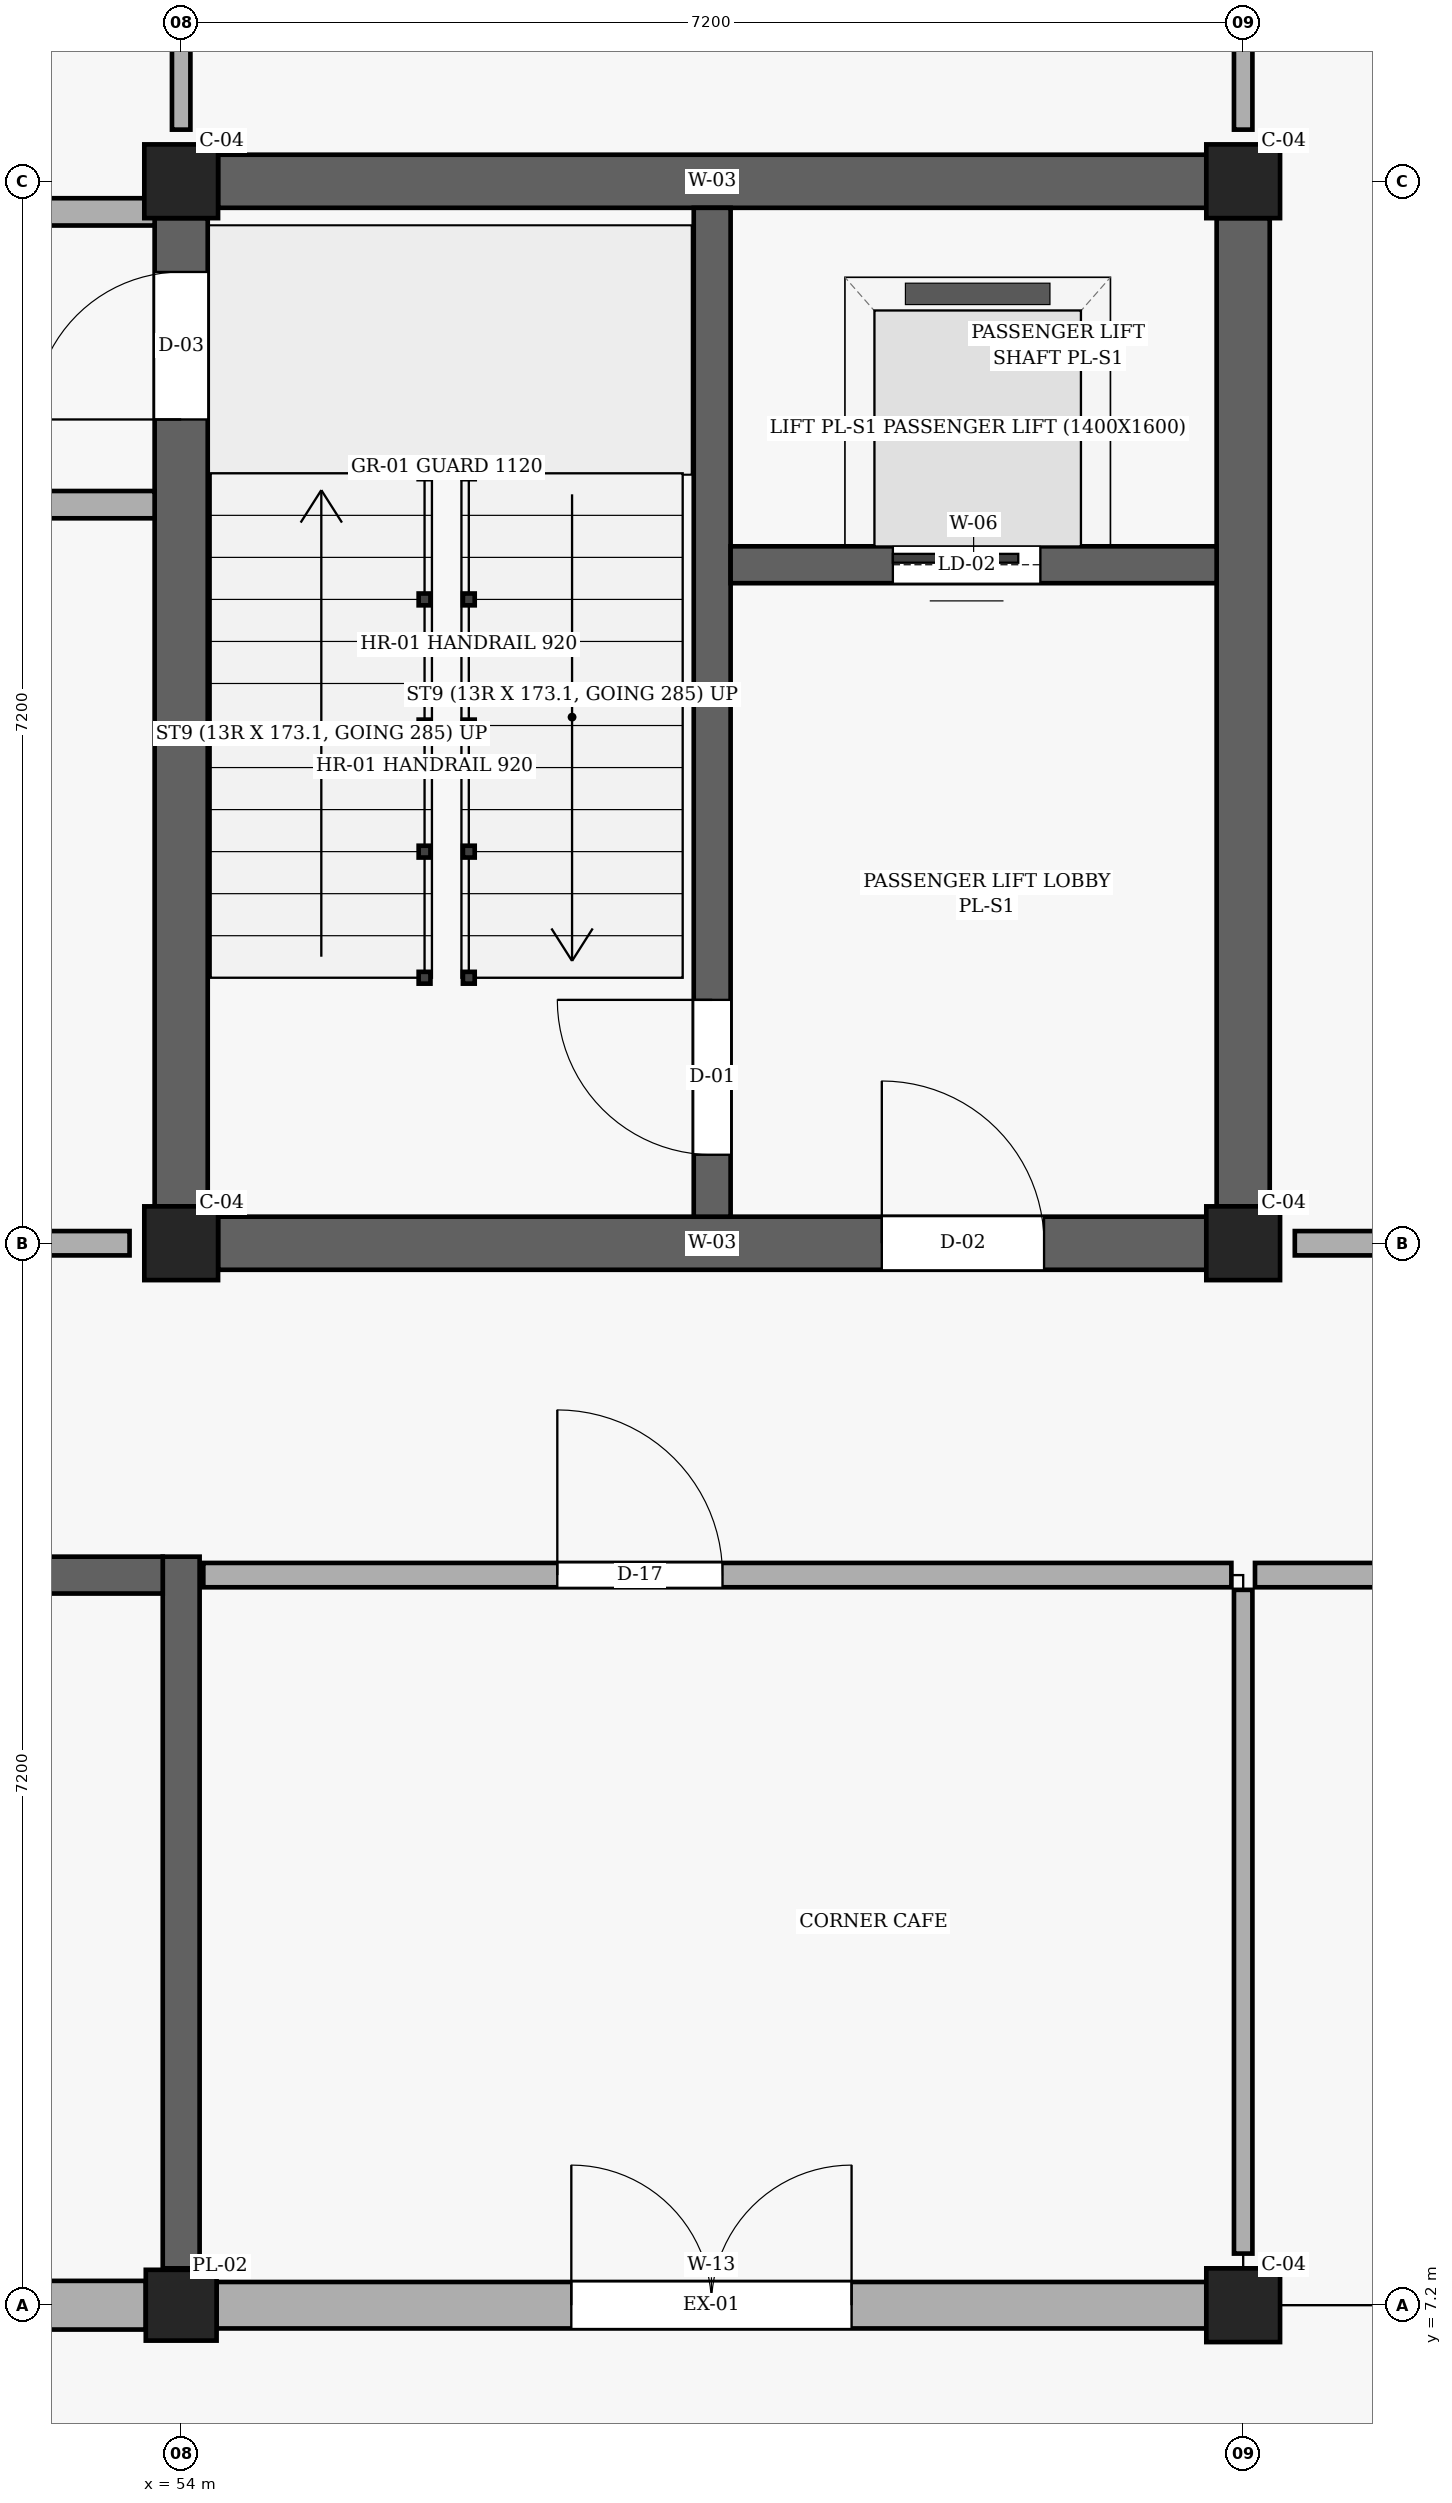
"""IFC4 building model, lengths in metres.
Left out: names, types, materials, properties, quantities, classifications, styles, units other than length and angle.
Written with IfcOpenShell. Run it as: python <this file> out.ifc"""

import sys

from ifc_helpers import new_model, si_unit, direction, frame, frame_2d, origin, origin_2d, place, context, subcontext, project, spatial, rectangle, extrude, element, fill, save


model = new_model("IFC4")
c1 = context("Model", 3, precision=1e-05, world=origin(), true_north=direction((0.0, 1.0)))
c2 = subcontext(c1, "Body", "Model", "MODEL_VIEW")
j1 = project(units=[si_unit("LENGTHUNIT", "METRE"), si_unit("PLANEANGLEUNIT", "RADIAN")], contexts=[c1])
p1 = place(None, origin())
s1 = spatial("IfcSite", under=j1, at=p1, CompositionType="ELEMENT")
p2 = place(p1, origin())
s2 = spatial("IfcBuilding", under=s1, at=p2, CompositionType="ELEMENT")
p3 = place(p2, origin())
s3 = spatial("IfcBuildingStorey", under=s2, at=p3, CompositionType="ELEMENT", Elevation=0.0)
p4 = place(p3, frame((54.0, 7.2, 0.0), z_axis=(0.0, 0.0, 1.0), x_axis=(1.0, 0.0, 0.0)))
e1 = element("IfcColumn", 1, at=p4, inside=s3, PredefinedType="PILASTER", context=c2, shape_type="SweptSolid", body=[
    extrude(rectangle(XDim=0.48, YDim=0.48, at=origin_2d()), origin(), (0.0, 0.0, 1.0), 4.5),
])
for number, where, z_axis, x_axis in (
    (2, (54.0, 14.4, 0.0), (0.0, 0.0, 1.0), (1.0, 0.0, 0.0)),
    (3, (54.0, 21.6, 0.0), (0.0, 0.0, 1.0), (1.0, 0.0, 0.0)),
    (4, (61.2, 7.2, 0.0), (0.0, 0.0, 1.0), (1.0, 0.0, 0.0)),
    (5, (61.2, 14.4, 0.0), (0.0, 0.0, 1.0), (1.0, 0.0, 0.0)),
    (6, (61.2, 21.6, 0.0), (0.0, 0.0, 1.0), (1.0, 0.0, 0.0)),
):
    element("IfcColumn", number, at=place(p3, frame(where, z_axis=z_axis, x_axis=x_axis)), inside=s3, PredefinedType="COLUMN", context=c2, shape_type="SweptSolid", body=[
        extrude(rectangle(XDim=0.5, YDim=0.5, at=origin_2d()), origin(), (0.0, 0.0, 1.0), 4.5),
    ])
p5 = place(p3, frame((47.05, 7.2, 0.0), z_axis=(0.0, 0.0, 1.0), x_axis=(1.0, 0.0, 0.0)))
e7 = element("IfcWall", 7, at=p5, inside=s3, PredefinedType="SOLIDWALL", context=c2, shape_type="SweptSolid", body=[
    extrude(rectangle(XDim=6.71, YDim=0.33, at=frame_2d((3.355, 0.0))), origin(), (0.0, 0.0, 1.0), 3.83),
])
p6 = place(p5, frame((2.5, 0.0, 0.0)))
e8 = element("IfcOpeningElement", 8, at=p6, cuts=e7, PredefinedType="OPENING", context=c2, shape_type="SweptSolid", body=[
    extrude(rectangle(XDim=1.06, YDim=2.15, at=frame_2d((0.53, 1.075))), frame((0.0, 0.175, 0.0), z_axis=(0.0, -1.0, 0.0), x_axis=(1.0, 0.0, 0.0)), (0.0, 0.0, 1.0), 0.35),
])
p7 = place(p3, frame((54.24, 7.2, 0.0), z_axis=(0.0, 0.0, 1.0), x_axis=(1.0, 0.0, 0.0)))
e9 = element("IfcWall", 9, at=p7, inside=s3, PredefinedType="SOLIDWALL", context=c2, shape_type="SweptSolid", body=[
    extrude(rectangle(XDim=6.71, YDim=0.315, at=frame_2d((3.355, 0.0))), origin(), (0.0, 0.0, 1.0), 3.83),
])
p8 = place(p7, frame((2.405, 0.0, 0.0)))
e10 = element("IfcOpeningElement", 10, at=p8, cuts=e9, PredefinedType="OPENING", context=c2, shape_type="SweptSolid", body=[
    extrude(rectangle(XDim=1.9, YDim=2.2, at=frame_2d((0.95, 1.1))), frame((0.0, 0.167, 0.0), z_axis=(0.0, -1.0, 0.0), x_axis=(1.0, 0.0, 0.0)), (0.0, 0.0, 1.0), 0.335),
])
p9 = place(p3, frame((54.0, 14.65, 0.0), z_axis=(0.0, 0.0, 1.0), x_axis=(0.0, 1.0, 0.0)))
e11 = element("IfcWall", 11, at=p9, inside=s3, PredefinedType="SHEAR", context=c2, shape_type="SweptSolid", body=[
    extrude(rectangle(XDim=6.7, YDim=0.36, at=frame_2d((3.35, 0.0))), origin(), (0.0, 0.0, 1.0), 4.26),
])
p10 = place(p9, frame((5.335, 0.0, 0.0)))
e12 = element("IfcOpeningElement", 12, at=p10, cuts=e11, PredefinedType="OPENING", context=c2, shape_type="SweptSolid", body=[
    extrude(rectangle(XDim=1.0, YDim=2.15, at=frame_2d((0.5, 1.075))), frame((0.0, 0.19, 0.0), z_axis=(0.0, -1.0, 0.0), x_axis=(1.0, 0.0, 0.0)), (0.0, 0.0, 1.0), 0.38),
])
p11 = place(p3, frame((54.25, 21.6, 0.0), z_axis=(0.0, 0.0, 1.0), x_axis=(1.0, 0.0, 0.0)))
e13 = element("IfcWall", 13, at=p11, inside=s3, PredefinedType="SHEAR", context=c2, shape_type="SweptSolid", body=[
    extrude(rectangle(XDim=6.7, YDim=0.36, at=frame_2d((3.35, 0.0))), origin(), (0.0, 0.0, 1.0), 4.26),
])
p12 = place(p3, frame((61.2, 14.65, 0.0), z_axis=(0.0, 0.0, 1.0), x_axis=(0.0, 1.0, 0.0)))
e14 = element("IfcWall", 14, at=p12, inside=s3, PredefinedType="SHEAR", context=c2, shape_type="SweptSolid", body=[
    extrude(rectangle(XDim=6.7, YDim=0.36, at=frame_2d((3.35, 0.0))), origin(), (0.0, 0.0, 1.0), 4.26),
])
p13 = place(p3, frame((54.25, 14.4, 0.0), z_axis=(0.0, 0.0, 1.0), x_axis=(1.0, 0.0, 0.0)))
e15 = element("IfcWall", 15, at=p13, inside=s3, PredefinedType="SHEAR", context=c2, shape_type="SweptSolid", body=[
    extrude(rectangle(XDim=6.7, YDim=0.36, at=frame_2d((3.35, 0.0))), origin(), (0.0, 0.0, 1.0), 4.26),
])
p14 = place(p13, frame((4.5, 0.0, 0.0)))
e16 = element("IfcOpeningElement", 16, at=p14, cuts=e15, PredefinedType="OPENING", context=c2, shape_type="SweptSolid", body=[
    extrude(rectangle(XDim=1.1, YDim=2.15, at=frame_2d((0.55, 1.075))), frame((0.0, 0.19, 0.0), z_axis=(0.0, -1.0, 0.0), x_axis=(1.0, 0.0, 0.0)), (0.0, 0.0, 1.0), 0.38),
])
p15 = place(p3, frame((57.6, 14.58, 0.0), z_axis=(0.0, 0.0, 1.0), x_axis=(0.0, 1.0, 0.0)))
e17 = element("IfcWall", 17, at=p15, inside=s3, PredefinedType="SHEAR", context=c2, shape_type="SweptSolid", body=[
    extrude(rectangle(XDim=6.84, YDim=0.25, at=frame_2d((3.42, 0.0))), origin(), (0.0, 0.0, 1.0), 4.26),
])
p16 = place(p15, frame((0.42, 0.0, 0.0)))
e18 = element("IfcOpeningElement", 18, at=p16, cuts=e17, PredefinedType="OPENING", context=c2, shape_type="SweptSolid", body=[
    extrude(rectangle(XDim=1.05, YDim=2.15, at=frame_2d((0.525, 1.075))), frame((0.0, 0.135, 0.0), z_axis=(0.0, -1.0, 0.0), x_axis=(1.0, 0.0, 0.0)), (0.0, 0.0, 1.0), 0.27),
])
p17 = place(p3, frame((57.725, 19.0, 0.0), z_axis=(0.0, 0.0, 1.0), x_axis=(1.0, 0.0, 0.0)))
e19 = element("IfcWall", 19, at=p17, inside=s3, PredefinedType="SHEAR", context=c2, shape_type="SweptSolid", body=[
    extrude(rectangle(XDim=3.295, YDim=0.25, at=frame_2d((1.647, 0.0))), origin(), (0.0, 0.0, 1.0), 4.26),
])
p18 = place(p17, frame((1.1, 0.0, 0.0)))
e20 = element("IfcOpeningElement", 20, at=p18, cuts=e19, PredefinedType="OPENING", context=c2, shape_type="SweptSolid", body=[
    extrude(rectangle(XDim=1.0, YDim=2.2, at=frame_2d((0.5, 1.1))), frame((0.0, 0.135, 0.0), z_axis=(0.0, -1.0, 0.0), x_axis=(1.0, 0.0, 0.0)), (0.0, 0.0, 1.0), 0.27),
])
p19 = place(p3, frame((54.0, 7.45, 0.0), z_axis=(0.0, 0.0, 1.0), x_axis=(0.0, 1.0, 0.0)))
e21 = element("IfcWall", 21, at=p19, inside=s3, PredefinedType="SHEAR", context=c2, shape_type="SweptSolid", body=[
    extrude(rectangle(XDim=4.825, YDim=0.25, at=frame_2d((2.413, 0.0))), origin(), (0.0, 0.0, 1.0), 3.41),
])
p20 = place(p3, frame((46.975, 12.15, 0.0), z_axis=(0.0, 0.0, 1.0), x_axis=(1.0, 0.0, 0.0)))
e22 = element("IfcWall", 22, at=p20, inside=s3, PredefinedType="SHEAR", context=c2, shape_type="SweptSolid", body=[
    extrude(rectangle(XDim=6.9, YDim=0.25, at=frame_2d((3.45, 0.0))), origin(), (0.0, 0.0, 1.0), 3.41),
])
p21 = place(p20, frame((2.4, 0.0, 0.0)))
e23 = element("IfcOpeningElement", 23, at=p21, cuts=e22, PredefinedType="OPENING", context=c2, shape_type="SweptSolid", body=[
    extrude(rectangle(XDim=1.0, YDim=2.15, at=frame_2d((0.5, 1.075))), frame((0.0, 0.135, 0.0), z_axis=(0.0, -1.0, 0.0), x_axis=(1.0, 0.0, 0.0)), (0.0, 0.0, 1.0), 0.27),
])
p22 = place(p3, frame((54.15, 12.15, 0.0), z_axis=(0.0, 0.0, 1.0), x_axis=(1.0, 0.0, 0.0)))
e24 = element("IfcWall", 24, at=p22, inside=s3, PredefinedType="PARTITIONING", context=c2, shape_type="SweptSolid", body=[
    extrude(rectangle(XDim=6.97, YDim=0.165, at=frame_2d((3.485, 0.0))), origin(), (0.0, 0.0, 1.0), 3.41),
])
p23 = place(p22, frame((2.4, 0.0, 0.0)))
e25 = element("IfcOpeningElement", 25, at=p23, cuts=e24, PredefinedType="OPENING", context=c2, shape_type="SweptSolid", body=[
    extrude(rectangle(XDim=1.12, YDim=2.18, at=frame_2d((0.56, 1.09))), frame((0.0, 0.093, 0.0), z_axis=(0.0, -1.0, 0.0), x_axis=(1.0, 0.0, 0.0)), (0.0, 0.0, 1.0), 0.185),
])
p24 = place(p3, frame((61.28, 12.15, 0.0), z_axis=(0.0, 0.0, 1.0), x_axis=(1.0, 0.0, 0.0)))
e26 = element("IfcWall", 26, at=p24, inside=s3, PredefinedType="PARTITIONING", context=c2, shape_type="SweptSolid", body=[
    extrude(rectangle(XDim=7.04, YDim=0.165, at=frame_2d((3.52, 0.0))), origin(), (0.0, 0.0, 1.0), 3.41),
])
p25 = place(p24, frame((2.4, 0.0, 0.0)))
e27 = element("IfcOpeningElement", 27, at=p25, cuts=e26, PredefinedType="OPENING", context=c2, shape_type="SweptSolid", body=[
    extrude(rectangle(XDim=1.12, YDim=2.18, at=frame_2d((0.56, 1.09))), frame((0.0, 0.093, 0.0), z_axis=(0.0, -1.0, 0.0), x_axis=(1.0, 0.0, 0.0)), (0.0, 0.0, 1.0), 0.185),
])
p26 = place(p3, frame((61.2, 7.55, 0.0), z_axis=(0.0, 0.0, 1.0), x_axis=(0.0, 1.0, 0.0)))
e28 = element("IfcWall", 28, at=p26, inside=s3, PredefinedType="PARTITIONING", context=c2, shape_type="SweptSolid", body=[
    extrude(rectangle(XDim=4.5, YDim=0.125, at=frame_2d((2.25, 0.0))), origin(), (0.0, 0.0, 1.0), 3.41),
])
p27 = place(p3, frame((47.15, 14.4, 0.0), z_axis=(0.0, 0.0, 1.0), x_axis=(1.0, 0.0, 0.0)))
e29 = element("IfcWall", 29, at=p27, inside=s3, PredefinedType="PARTITIONING", context=c2, shape_type="SweptSolid", body=[
    extrude(rectangle(XDim=6.5, YDim=0.165, at=frame_2d((3.25, 0.0))), origin(), (0.0, 0.0, 1.0), 3.41),
])
p28 = place(p27, frame((2.4, 0.0, 0.0)))
e30 = element("IfcOpeningElement", 30, at=p28, cuts=e29, PredefinedType="OPENING", context=c2, shape_type="SweptSolid", body=[
    extrude(rectangle(XDim=1.02, YDim=2.15, at=frame_2d((0.51, 1.075))), frame((0.0, 0.093, 0.0), z_axis=(0.0, -1.0, 0.0), x_axis=(1.0, 0.0, 0.0)), (0.0, 0.0, 1.0), 0.185),
])
p29 = place(p3, frame((61.55, 14.4, 0.0), z_axis=(0.0, 0.0, 1.0), x_axis=(1.0, 0.0, 0.0)))
e31 = element("IfcWall", 31, at=p29, inside=s3, PredefinedType="PARTITIONING", context=c2, shape_type="SweptSolid", body=[
    extrude(rectangle(XDim=13.7, YDim=0.165, at=frame_2d((6.85, 0.0))), origin(), (0.0, 0.0, 1.0), 3.41),
])
p30 = place(p29, frame((2.4, 0.0, 0.0)))
e32 = element("IfcOpeningElement", 32, at=p30, cuts=e31, PredefinedType="OPENING", context=c2, shape_type="SweptSolid", body=[
    extrude(rectangle(XDim=1.5, YDim=2.25, at=frame_2d((0.75, 1.125))), frame((0.0, 0.093, 0.0), z_axis=(0.0, -1.0, 0.0), x_axis=(1.0, 0.0, 0.0)), (0.0, 0.0, 1.0), 0.185),
])
p31 = place(p3, frame((54.0, 21.95, 0.0), z_axis=(0.0, 0.0, 1.0), x_axis=(0.0, 1.0, 0.0)))
e33 = element("IfcWall", 33, at=p31, inside=s3, PredefinedType="PARTITIONING", context=c2, shape_type="SweptSolid", body=[
    extrude(rectangle(XDim=6.5, YDim=0.125, at=frame_2d((3.25, 0.0))), origin(), (0.0, 0.0, 1.0), 3.41),
])
p32 = place(p31, frame((2.4, 0.0, 0.0)))
e34 = element("IfcOpeningElement", 34, at=p32, cuts=e33, PredefinedType="OPENING", context=c2, shape_type="SweptSolid", body=[
    extrude(rectangle(XDim=1.02, YDim=2.15, at=frame_2d((0.51, 1.075))), frame((0.0, 0.073, 0.0), z_axis=(0.0, -1.0, 0.0), x_axis=(1.0, 0.0, 0.0)), (0.0, 0.0, 1.0), 0.145),
])
p33 = place(p3, frame((61.2, 21.95, 0.0), z_axis=(0.0, 0.0, 1.0), x_axis=(0.0, 1.0, 0.0)))
e35 = element("IfcWall", 35, at=p33, inside=s3, PredefinedType="PARTITIONING", context=c2, shape_type="SweptSolid", body=[
    extrude(rectangle(XDim=6.5, YDim=0.125, at=frame_2d((3.25, 0.0))), origin(), (0.0, 0.0, 1.0), 3.41),
])
p34 = place(p33, frame((2.4, 0.0, 0.0)))
e36 = element("IfcOpeningElement", 36, at=p34, cuts=e35, PredefinedType="OPENING", context=c2, shape_type="SweptSolid", body=[
    extrude(rectangle(XDim=1.5, YDim=2.25, at=frame_2d((0.75, 1.125))), frame((0.0, 0.073, 0.0), z_axis=(0.0, -1.0, 0.0), x_axis=(1.0, 0.0, 0.0)), (0.0, 0.0, 1.0), 0.145),
])
for number, where, z_axis, x_axis in (
    (37, (46.96, 19.407, 0.0), (0.0, 0.0, 1.0), (1.0, 0.0, 0.0)),
    (38, (46.96, 21.393, 0.0), (0.0, 0.0, 1.0), (1.0, 0.0, 0.0)),
):
    element("IfcWall", number, at=place(p3, frame(where, z_axis=z_axis, x_axis=x_axis)), inside=s3, PredefinedType="PARTITIONING", context=c2, shape_type="SweptSolid", body=[
        extrude(rectangle(XDim=6.86, YDim=0.185, at=frame_2d((3.43, 0.0))), origin(), (0.0, 0.0, 1.0), 3.41),
    ])
p35 = place(p8, frame((1.9, 0.0, 0.0), z_axis=(0.0, 0.0, 1.0), x_axis=(-1.0, 0.0, 0.0)))
e39 = element("IfcDoor", 39, at=p35, inside=s3, OperationType="DOUBLE_DOOR_SINGLE_SWING", PredefinedType="DOOR", context=c2, shape_type="SweptSolid", body=[
    extrude(rectangle(XDim=1.9, YDim=2.2, at=frame_2d((0.95, 1.1))), frame((0.0, 0.025, 0.0), z_axis=(0.0, -1.0, 0.0), x_axis=(1.0, 0.0, 0.0)), (0.0, 0.0, 1.0), 0.05),
])
fill(e10, e39)
p36 = place(p14, frame((1.1, 0.0, 0.0), z_axis=(0.0, 0.0, 1.0), x_axis=(-1.0, 0.0, 0.0)))
e40 = element("IfcDoor", 40, at=p36, inside=s3, OperationType="SINGLE_SWING_LEFT", PredefinedType="DOOR", context=c2, shape_type="SweptSolid", body=[
    extrude(rectangle(XDim=1.1, YDim=2.15, at=frame_2d((0.55, 1.075))), frame((0.0, 0.025, 0.0), z_axis=(0.0, -1.0, 0.0), x_axis=(1.0, 0.0, 0.0)), (0.0, 0.0, 1.0), 0.05),
])
fill(e16, e40)
p37 = place(p16, frame((1.05, 0.0, 0.0), z_axis=(0.0, 0.0, 1.0), x_axis=(-1.0, 0.0, 0.0)))
e41 = element("IfcDoor", 41, at=p37, inside=s3, OperationType="SINGLE_SWING_RIGHT", PredefinedType="DOOR", context=c2, shape_type="SweptSolid", body=[
    extrude(rectangle(XDim=1.05, YDim=2.15, at=frame_2d((0.525, 1.075))), frame((0.0, 0.025, 0.0), z_axis=(0.0, -1.0, 0.0), x_axis=(1.0, 0.0, 0.0)), (0.0, 0.0, 1.0), 0.05),
])
fill(e18, e41)
p38 = place(p18, origin())
e42 = element("IfcDoor", 42, at=p38, inside=s3, OperationType="SLIDING_TO_LEFT", PredefinedType="DOOR", context=c2, shape_type="SweptSolid", body=[
    extrude(rectangle(XDim=1.0, YDim=2.2, at=frame_2d((0.5, 1.1))), frame((0.0, 0.025, 0.0), z_axis=(0.0, -1.0, 0.0), x_axis=(1.0, 0.0, 0.0)), (0.0, 0.0, 1.0), 0.05),
])
fill(e20, e42)
p39 = place(p23, origin())
e43 = element("IfcDoor", 43, at=p39, inside=s3, OperationType="SINGLE_SWING_LEFT", PredefinedType="DOOR", context=c2, shape_type="SweptSolid", body=[
    extrude(rectangle(XDim=1.12, YDim=2.18, at=frame_2d((0.56, 1.09))), frame((0.0, 0.025, 0.0), z_axis=(0.0, -1.0, 0.0), x_axis=(1.0, 0.0, 0.0)), (0.0, 0.0, 1.0), 0.05),
])
fill(e25, e43)
p40 = place(p10, origin())
e44 = element("IfcDoor", 44, at=p40, inside=s3, OperationType="SINGLE_SWING_LEFT", PredefinedType="DOOR", context=c2, shape_type="SweptSolid", body=[
    extrude(rectangle(XDim=1.0, YDim=2.15, at=frame_2d((0.5, 1.075))), frame((0.0, 0.025, 0.0), z_axis=(0.0, -1.0, 0.0), x_axis=(1.0, 0.0, 0.0)), (0.0, 0.0, 1.0), 0.05),
])
fill(e12, e44)
save(model, sys.argv[1])
